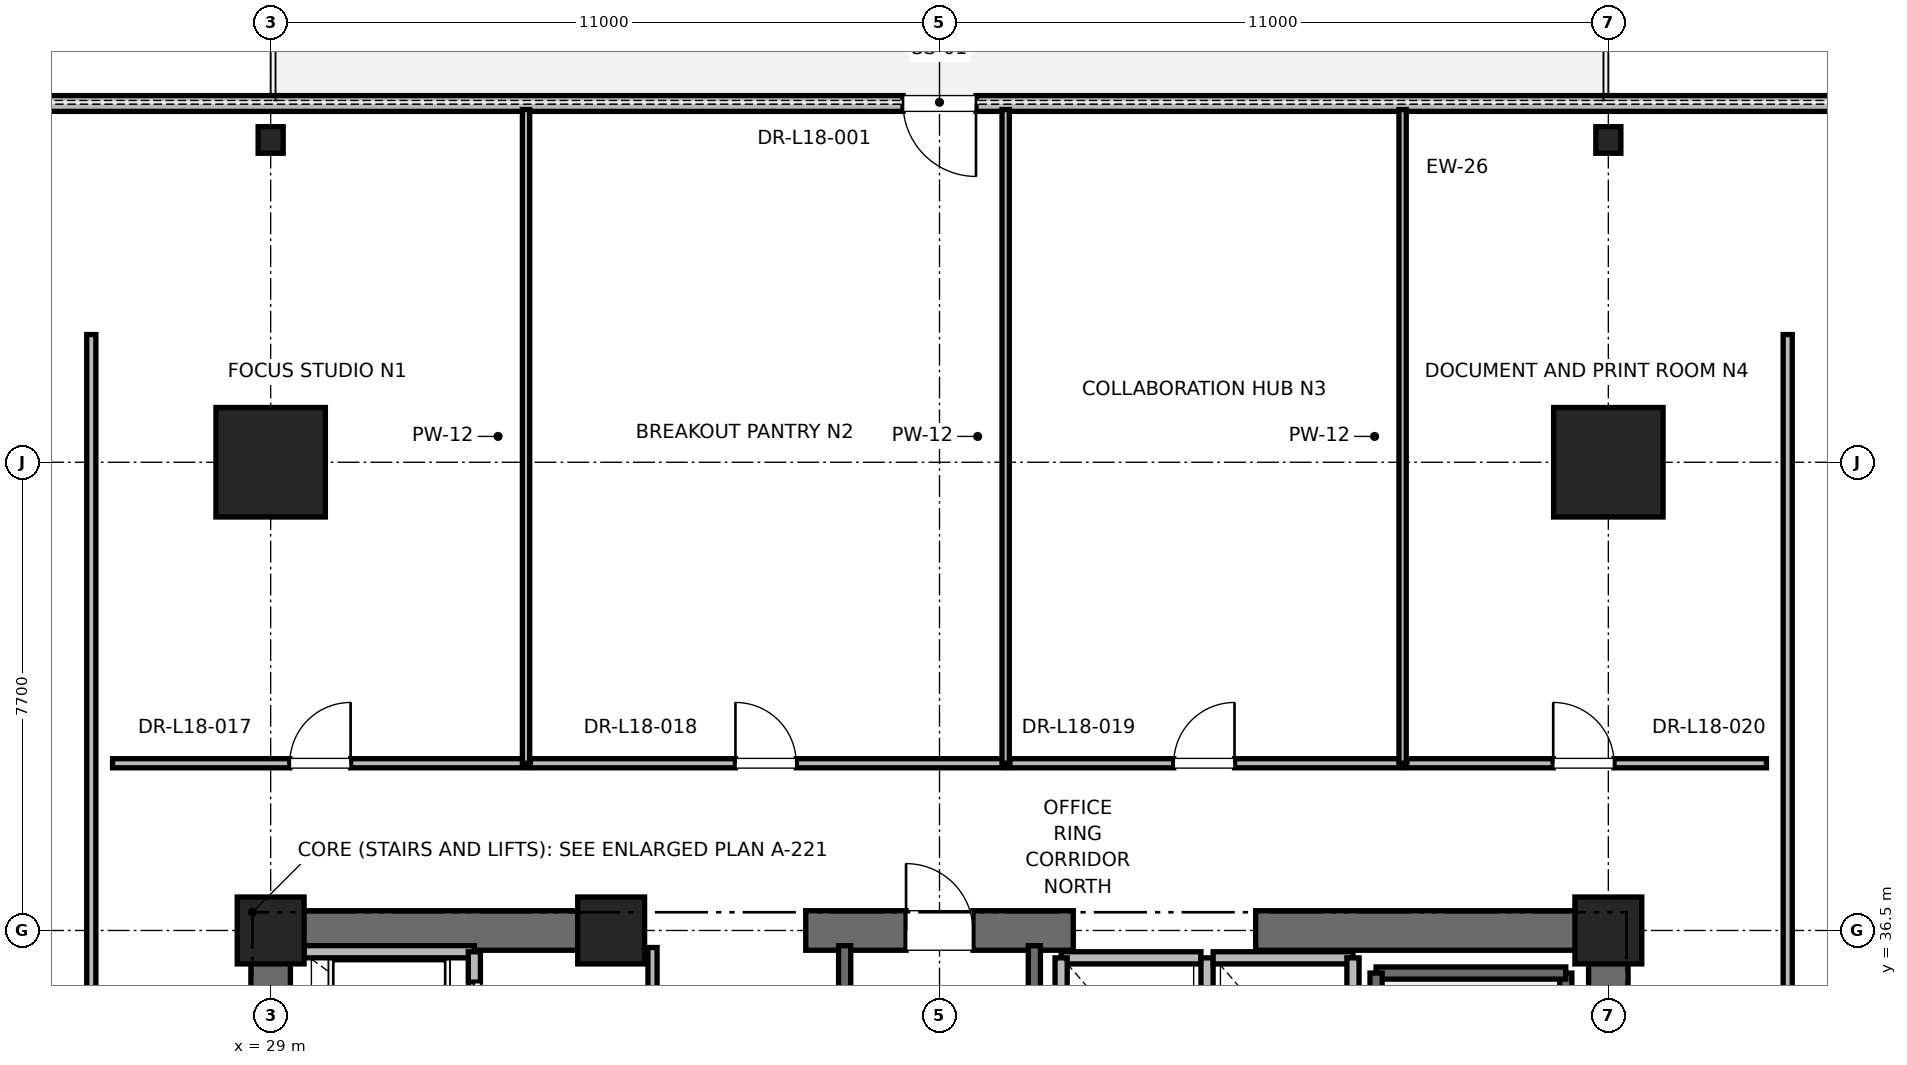
"""IFC4 building model, lengths in metres.
Left out: names, types, materials, properties, quantities, classifications, styles, units other than length and angle.
Written with IfcOpenShell. Run it as: python <this file> out.ifc"""

import sys

from ifc_helpers import new_model, si_unit, direction, frame, frame_2d, origin, origin_2d, place, context, subcontext, project, spatial, rectangle, i_section, extrude, element, fill, save


model = new_model("IFC4")
c1 = context("Model", 3, precision=1e-05, world=origin(), true_north=direction((0.0, 1.0)))
c2 = subcontext(c1, "Body", "Model", "MODEL_VIEW")
j1 = project(units=[si_unit("LENGTHUNIT", "METRE"), si_unit("PLANEANGLEUNIT", "RADIAN")], contexts=[c1])
p1 = place(None, origin())
s1 = spatial("IfcSite", under=j1, at=p1, CompositionType="ELEMENT")
p2 = place(p1, origin())
s2 = spatial("IfcBuilding", under=s1, at=p2, CompositionType="ELEMENT")
p3 = place(p2, frame((0.0, 0.0, 79.6)))
s3 = spatial("IfcBuildingStorey", under=s2, at=p3, CompositionType="ELEMENT", Elevation=79.6)
for number, where, z_axis, x_axis in (
    (1, (29.0, 44.2, 0.0), (0.0, 0.0, 1.0), (1.0, 0.0, 0.0)),
    (2, (51.0, 44.2, 0.0), (0.0, 0.0, 1.0), (1.0, 0.0, 0.0)),
):
    element("IfcColumn", number, at=place(p3, frame(where, z_axis=z_axis, x_axis=x_axis)), inside=s3, PredefinedType="COLUMN", context=c2, shape_type="SweptSolid", body=[
        extrude(rectangle(XDim=1.8, YDim=1.8, at=origin_2d()), origin(), (0.0, 0.0, 1.0), 4.0),
    ])
for number, where, z_axis, x_axis in (
    (3, (29.0, 49.5, 0.0), (0.0, 0.0, 1.0), (1.0, 0.0, 0.0)),
    (4, (51.0, 49.5, 0.0), (0.0, 0.0, 1.0), (1.0, 0.0, 0.0)),
):
    element("IfcColumn", number, at=place(p3, frame(where, z_axis=z_axis, x_axis=x_axis)), inside=s3, PredefinedType="COLUMN", context=c2, shape_type="SweptSolid", body=[
        extrude(i_section(OverallWidth=0.412, OverallDepth=0.437, WebThickness=0.036, FlangeThickness=0.058, FilletRadius=0.015, at=origin_2d()), origin(), (0.0, 0.0, 1.0), 4.0),
    ])
for number, where, z_axis, x_axis in (
    (5, (29.0, 36.5, 0.0), (0.0, 0.0, 1.0), (1.0, 0.0, 0.0)),
    (6, (51.0, 36.5, 0.0), (0.0, 0.0, 1.0), (1.0, 0.0, 0.0)),
    (7, (34.6, 36.5, 0.0), (0.0, 0.0, 1.0), (1.0, 0.0, 0.0)),
):
    element("IfcColumn", number, at=place(p3, frame(where, z_axis=z_axis, x_axis=x_axis)), inside=s3, PredefinedType="PILASTER", context=c2, shape_type="SweptSolid", body=[
        extrude(rectangle(XDim=1.1, YDim=1.1, at=origin_2d()), origin(), (0.0, 0.0, 1.0), 4.0),
    ])
p4 = place(p3, frame((29.0, 36.5, 0.0), z_axis=(0.0, 0.0, 1.0), x_axis=(1.0, 0.0, 0.0)))
e8 = element("IfcWall", 8, at=p4, inside=s3, PredefinedType="SHEAR", context=c2, shape_type="SweptSolid", body=[
    extrude(rectangle(XDim=5.8, YDim=0.65, at=frame_2d((2.9, 0.0))), origin(), (0.0, 0.0, 1.0), 3.76),
])
p5 = place(p3, frame((37.8, 36.5, 0.0), z_axis=(0.0, 0.0, 1.0), x_axis=(1.0, 0.0, 0.0)))
e9 = element("IfcWall", 9, at=p5, inside=s3, PredefinedType="SHEAR", context=c2, shape_type="SweptSolid", body=[
    extrude(rectangle(XDim=4.4, YDim=0.65, at=frame_2d((2.2, 0.0))), origin(), (0.0, 0.0, 1.0), 3.76),
])
p6 = place(p5, frame((1.65, 0.0, 0.0)))
e10 = element("IfcOpeningElement", 10, at=p6, cuts=e9, PredefinedType="OPENING", context=c2, shape_type="SweptSolid", body=[
    extrude(rectangle(XDim=1.1, YDim=2.15, at=frame_2d((0.55, 1.075))), frame((0.0, 0.325, 0.0), z_axis=(0.0, -1.0, 0.0), x_axis=(1.0, 0.0, 0.0)), (0.0, 0.0, 1.0), 0.65),
])
for number, where, z_axis, x_axis in (
    (11, (45.2, 36.5, 0.0), (0.0, 0.0, 1.0), (1.0, 0.0, 0.0)),
    (12, (29.0, 30.7, 0.0), (0.0, 0.0, 1.0), (0.0, 1.0, 0.0)),
):
    element("IfcWall", number, at=place(p3, frame(where, z_axis=z_axis, x_axis=x_axis)), inside=s3, PredefinedType="SHEAR", context=c2, shape_type="SweptSolid", body=[
        extrude(rectangle(XDim=5.8, YDim=0.65, at=frame_2d((2.9, 0.0))), origin(), (0.0, 0.0, 1.0), 3.76),
    ])
p7 = place(p3, frame((51.0, 27.7, 0.0), z_axis=(0.0, 0.0, 1.0), x_axis=(0.0, 1.0, 0.0)))
e13 = element("IfcWall", 13, at=p7, inside=s3, PredefinedType="SHEAR", context=c2, shape_type="SweptSolid", body=[
    extrude(rectangle(XDim=8.8, YDim=0.65, at=frame_2d((4.4, 0.0))), origin(), (0.0, 0.0, 1.0), 3.76),
])
p8 = place(p3, frame((62.429, 50.1, 0.0), z_axis=(0.0, 0.0, 1.0), x_axis=(-1.0, 0.0, 0.0)))
e14 = element("IfcWall", 14, at=p8, inside=s3, PredefinedType="PARAPET", context=c2, shape_type="SweptSolid", body=[
    extrude(rectangle(XDim=44.857, YDim=0.26, at=frame_2d((22.429, 0.0))), origin(), (0.0, 0.0, 1.0), 3.273),
])
p9 = place(p8, frame((4.2, 0.0, 0.85)))
e15 = element("IfcOpeningElement", 15, at=p9, cuts=e14, PredefinedType="OPENING", context=c2, shape_type="SweptSolid", body=[
    extrude(rectangle(XDim=1.8, YDim=2.2, at=frame_2d((0.9, 1.1))), frame((0.0, 0.13, 0.0), z_axis=(0.0, -1.0, 0.0), x_axis=(1.0, 0.0, 0.0)), (0.0, 0.0, 1.0), 0.26),
])
p10 = place(p8, frame((21.829, 0.0, 0.0)))
e16 = element("IfcOpeningElement", 16, at=p10, cuts=e14, PredefinedType="OPENING", context=c2, shape_type="SweptSolid", body=[
    extrude(rectangle(XDim=1.2, YDim=2.2, at=frame_2d((0.6, 1.1))), frame((0.0, 0.13, 0.0), z_axis=(0.0, -1.0, 0.0), x_axis=(1.0, 0.0, 0.0)), (0.0, 0.0, 1.0), 0.26),
])
p11 = place(p8, frame((38.857, 0.0, 0.85)))
e17 = element("IfcOpeningElement", 17, at=p11, cuts=e14, PredefinedType="OPENING", context=c2, shape_type="SweptSolid", body=[
    extrude(rectangle(XDim=1.8, YDim=2.2, at=frame_2d((0.9, 1.1))), frame((0.0, 0.13, 0.0), z_axis=(0.0, -1.0, 0.0), x_axis=(1.0, 0.0, 0.0)), (0.0, 0.0, 1.0), 0.26),
])
p12 = place(p3, frame((50.3, 27.65, 0.0), z_axis=(0.0, 0.0, 1.0), x_axis=(0.0, 1.0, 0.0)))
e18 = element("IfcWall", 18, at=p12, inside=s3, PredefinedType="SOLIDWALL", context=c2, shape_type="SweptSolid", body=[
    extrude(rectangle(XDim=8.15, YDim=0.2, at=frame_2d((4.075, 0.0))), origin(), (0.0, 0.0, 1.0), 3.76),
])
p13 = place(p3, frame((47.18, 35.8, 0.0), z_axis=(0.0, 0.0, 1.0), x_axis=(1.0, 0.0, 0.0)))
e19 = element("IfcWall", 19, at=p13, inside=s3, PredefinedType="SOLIDWALL", context=c2, shape_type="SweptSolid", body=[
    extrude(rectangle(XDim=3.12, YDim=0.2, at=frame_2d((1.56, 0.0))), origin(), (0.0, 0.0, 1.0), 3.76),
])
p14 = place(p3, frame((47.18, 27.62, 0.0), z_axis=(0.0, 0.0, 1.0), x_axis=(0.0, 1.0, 0.0)))
e20 = element("IfcWall", 20, at=p14, inside=s3, PredefinedType="SOLIDWALL", context=c2, shape_type="SweptSolid", body=[
    extrude(rectangle(XDim=8.18, YDim=0.2, at=frame_2d((4.09, 0.0))), origin(), (0.0, 0.0, 1.0), 3.76),
])
p15 = place(p3, frame((38.44, 27.38, 0.0), z_axis=(0.0, 0.0, 1.0), x_axis=(0.0, 1.0, 0.0)))
e21 = element("IfcWall", 21, at=p15, inside=s3, PredefinedType="SOLIDWALL", context=c2, shape_type="SweptSolid", body=[
    extrude(rectangle(XDim=8.87, YDim=0.2, at=frame_2d((4.435, 0.0))), origin(), (0.0, 0.0, 1.0), 3.76),
])
p16 = place(p3, frame((41.56, 27.68, 0.0), z_axis=(0.0, 0.0, 1.0), x_axis=(0.0, 1.0, 0.0)))
e22 = element("IfcWall", 22, at=p16, inside=s3, PredefinedType="SOLIDWALL", context=c2, shape_type="SweptSolid", body=[
    extrude(rectangle(XDim=8.57, YDim=0.2, at=frame_2d((4.285, 0.0))), origin(), (0.0, 0.0, 1.0), 3.76),
])
p17 = place(p3, frame((32.35, 36.15, 0.0), z_axis=(0.0, 0.0, 1.0), x_axis=(-1.0, 0.0, 0.0)))
e23 = element("IfcWall", 23, at=p17, inside=s3, PredefinedType="SOLIDWALL", context=c2, shape_type="SweptSolid", body=[
    extrude(rectangle(XDim=2.8, YDim=0.2, at=frame_2d((1.4, 0.0))), origin(), (0.0, 0.0, 1.0), 2.889),
])
p18 = place(p3, frame((32.35, 34.05, 0.0), z_axis=(0.0, 0.0, 1.0), x_axis=(0.0, 1.0, 0.0)))
e24 = element("IfcWall", 24, at=p18, inside=s3, PredefinedType="SOLIDWALL", context=c2, shape_type="SweptSolid", body=[
    extrude(rectangle(XDim=2.1, YDim=0.2, at=frame_2d((1.05, 0.0))), origin(), (0.0, 0.0, 1.0), 3.76),
])
p19 = place(p18, frame((0.5, 0.0, 0.0)))
e25 = element("IfcOpeningElement", 25, at=p19, cuts=e24, PredefinedType="OPENING", context=c2, shape_type="SweptSolid", body=[
    extrude(rectangle(XDim=1.1, YDim=2.2, at=frame_2d((0.55, 1.1))), frame((0.0, 0.1, 0.0), z_axis=(0.0, -1.0, 0.0), x_axis=(1.0, 0.0, 0.0)), (0.0, 0.0, 1.0), 0.2),
])
p20 = place(p3, frame((44.3, 36.05, 0.0), z_axis=(0.0, 0.0, 1.0), x_axis=(-1.0, 0.0, 0.0)))
e26 = element("IfcWall", 26, at=p20, inside=s3, PredefinedType="SOLIDWALL", context=c2, shape_type="SweptSolid", body=[
    extrude(rectangle(XDim=2.3, YDim=0.2, at=frame_2d((1.15, 0.0))), origin(), (0.0, 0.0, 1.0), 2.54),
])
for number, where, z_axis, x_axis in (
    (27, (42.0, 36.05, 0.0), (0.0, 0.0, 1.0), (0.0, -1.0, 0.0)),
    (28, (44.4, 33.45, 0.0), (0.0, 0.0, 1.0), (0.0, 1.0, 0.0)),
):
    element("IfcWall", number, at=place(p3, frame(where, z_axis=z_axis, x_axis=x_axis)), inside=s3, PredefinedType="SOLIDWALL", context=c2, shape_type="SweptSolid", body=[
        extrude(rectangle(XDim=2.6, YDim=0.2, at=frame_2d((1.3, 0.0))), origin(), (0.0, 0.0, 1.0), 2.54),
    ])
p21 = place(p3, frame((46.8, 36.05, 0.0), z_axis=(0.0, 0.0, 1.0), x_axis=(-1.0, 0.0, 0.0)))
e29 = element("IfcWall", 29, at=p21, inside=s3, PredefinedType="SOLIDWALL", context=c2, shape_type="SweptSolid", body=[
    extrude(rectangle(XDim=2.3, YDim=0.2, at=frame_2d((1.15, 0.0))), origin(), (0.0, 0.0, 1.0), 2.54),
])
p22 = place(p3, frame((46.8, 33.45, 0.0), z_axis=(0.0, 0.0, 1.0), x_axis=(0.0, 1.0, 0.0)))
e30 = element("IfcWall", 30, at=p22, inside=s3, PredefinedType="SOLIDWALL", context=c2, shape_type="SweptSolid", body=[
    extrude(rectangle(XDim=2.6, YDim=0.2, at=frame_2d((1.3, 0.0))), origin(), (0.0, 0.0, 1.0), 3.76),
])
p23 = place(p3, frame((35.28, 33.95, 0.0), z_axis=(0.0, 0.0, 1.0), x_axis=(0.0, 1.0, 0.0)))
e31 = element("IfcWall", 31, at=p23, inside=s3, PredefinedType="PARTITIONING", context=c2, shape_type="SweptSolid", body=[
    extrude(rectangle(XDim=2.27, YDim=0.15, at=frame_2d((1.135, 0.0))), origin(), (0.0, 0.0, 1.0), 2.54),
])
p24 = place(p23, frame((0.66, 0.0, 0.0)))
e32 = element("IfcOpeningElement", 32, at=p24, cuts=e31, PredefinedType="OPENING", context=c2, shape_type="SweptSolid", body=[
    extrude(rectangle(XDim=0.95, YDim=2.15, at=frame_2d((0.475, 1.075))), frame((0.0, 0.075, 0.0), z_axis=(0.0, -1.0, 0.0), x_axis=(1.0, 0.0, 0.0)), (0.0, 0.0, 1.0), 0.15),
])
p25 = place(p3, frame((26.4, 39.25, 0.0), z_axis=(0.0, 0.0, 1.0), x_axis=(1.0, 0.0, 0.0)))
e33 = element("IfcWall", 33, at=p25, inside=s3, PredefinedType="PARTITIONING", context=c2, shape_type="SweptSolid", body=[
    extrude(rectangle(XDim=6.8, YDim=0.15, at=frame_2d((3.4, 0.0))), origin(), (0.0, 0.0, 1.0), 2.85),
])
p26 = place(p25, frame((2.915, 0.0, 0.0)))
e34 = element("IfcOpeningElement", 34, at=p26, cuts=e33, PredefinedType="OPENING", context=c2, shape_type="SweptSolid", body=[
    extrude(rectangle(XDim=1.0, YDim=2.15, at=frame_2d((0.5, 1.075))), frame((0.0, 0.075, 0.0), z_axis=(0.0, -1.0, 0.0), x_axis=(1.0, 0.0, 0.0)), (0.0, 0.0, 1.0), 0.15),
])
p27 = place(p3, frame((33.2, 39.25, 0.0), z_axis=(0.0, 0.0, 1.0), x_axis=(0.0, 1.0, 0.0)))
e35 = element("IfcWall", 35, at=p27, inside=s3, PredefinedType="PARTITIONING", context=c2, shape_type="SweptSolid", body=[
    extrude(rectangle(XDim=10.75, YDim=0.12, at=frame_2d((5.375, 0.0))), origin(), (0.0, 0.0, 1.0), 2.39),
])
p28 = place(p3, frame((33.27, 39.25, 0.0), z_axis=(0.0, 0.0, 1.0), x_axis=(1.0, 0.0, 0.0)))
e36 = element("IfcWall", 36, at=p28, inside=s3, PredefinedType="PARTITIONING", context=c2, shape_type="SweptSolid", body=[
    extrude(rectangle(XDim=7.818, YDim=0.15, at=frame_2d((3.909, 0.0))), origin(), (0.0, 0.0, 1.0), 2.85),
])
p29 = place(p28, frame((3.374, 0.0, 0.0)))
e37 = element("IfcOpeningElement", 37, at=p29, cuts=e36, PredefinedType="OPENING", context=c2, shape_type="SweptSolid", body=[
    extrude(rectangle(XDim=1.0, YDim=2.15, at=frame_2d((0.5, 1.075))), frame((0.0, 0.075, 0.0), z_axis=(0.0, -1.0, 0.0), x_axis=(1.0, 0.0, 0.0)), (0.0, 0.0, 1.0), 0.15),
])
p30 = place(p3, frame((41.088, 39.25, 0.0), z_axis=(0.0, 0.0, 1.0), x_axis=(0.0, 1.0, 0.0)))
e38 = element("IfcWall", 38, at=p30, inside=s3, PredefinedType="PARTITIONING", context=c2, shape_type="SweptSolid", body=[
    extrude(rectangle(XDim=10.75, YDim=0.12, at=frame_2d((5.375, 0.0))), origin(), (0.0, 0.0, 1.0), 2.39),
])
p31 = place(p3, frame((41.158, 39.25, 0.0), z_axis=(0.0, 0.0, 1.0), x_axis=(1.0, 0.0, 0.0)))
e39 = element("IfcWall", 39, at=p31, inside=s3, PredefinedType="PARTITIONING", context=c2, shape_type="SweptSolid", body=[
    extrude(rectangle(XDim=6.458, YDim=0.15, at=frame_2d((3.229, 0.0))), origin(), (0.0, 0.0, 1.0), 2.85),
])
p32 = place(p31, frame((2.694, 0.0, 0.0)))
e40 = element("IfcOpeningElement", 40, at=p32, cuts=e39, PredefinedType="OPENING", context=c2, shape_type="SweptSolid", body=[
    extrude(rectangle(XDim=1.0, YDim=2.15, at=frame_2d((0.5, 1.075))), frame((0.0, 0.075, 0.0), z_axis=(0.0, -1.0, 0.0), x_axis=(1.0, 0.0, 0.0)), (0.0, 0.0, 1.0), 0.15),
])
p33 = place(p3, frame((47.616, 39.25, 0.0), z_axis=(0.0, 0.0, 1.0), x_axis=(0.0, 1.0, 0.0)))
e41 = element("IfcWall", 41, at=p33, inside=s3, PredefinedType="PARTITIONING", context=c2, shape_type="SweptSolid", body=[
    extrude(rectangle(XDim=10.75, YDim=0.12, at=frame_2d((5.375, 0.0))), origin(), (0.0, 0.0, 1.0), 2.39),
])
p34 = place(p3, frame((47.686, 39.25, 0.0), z_axis=(0.0, 0.0, 1.0), x_axis=(1.0, 0.0, 0.0)))
e42 = element("IfcWall", 42, at=p34, inside=s3, PredefinedType="PARTITIONING", context=c2, shape_type="SweptSolid", body=[
    extrude(rectangle(XDim=5.914, YDim=0.15, at=frame_2d((2.957, 0.0))), origin(), (0.0, 0.0, 1.0), 2.85),
])
p35 = place(p34, frame((2.407, 0.0, 0.0)))
e43 = element("IfcOpeningElement", 43, at=p35, cuts=e42, PredefinedType="OPENING", context=c2, shape_type="SweptSolid", body=[
    extrude(rectangle(XDim=1.0, YDim=2.15, at=frame_2d((0.5, 1.075))), frame((0.0, 0.075, 0.0), z_axis=(0.0, -1.0, 0.0), x_axis=(1.0, 0.0, 0.0)), (0.0, 0.0, 1.0), 0.15),
])
p36 = place(p3, frame((26.05, 8.7, 0.0), z_axis=(0.0, 0.0, 1.0), x_axis=(0.0, 1.0, 0.0)))
e44 = element("IfcWall", 44, at=p36, inside=s3, PredefinedType="PARTITIONING", context=c2, shape_type="SweptSolid", body=[
    extrude(rectangle(XDim=37.6, YDim=0.15, at=frame_2d((18.8, 0.0))), origin(), (0.0, 0.0, 1.0), 2.85),
])
p37 = place(p36, frame((18.3, 0.0, 0.0)))
e45 = element("IfcOpeningElement", 45, at=p37, cuts=e44, PredefinedType="OPENING", context=c2, shape_type="SweptSolid", body=[
    extrude(rectangle(XDim=1.0, YDim=2.15, at=frame_2d((0.5, 1.075))), frame((0.0, 0.075, 0.0), z_axis=(0.0, -1.0, 0.0), x_axis=(1.0, 0.0, 0.0)), (0.0, 0.0, 1.0), 0.15),
])
p38 = place(p3, frame((53.95, 29.826, 0.0), z_axis=(0.0, 0.0, 1.0), x_axis=(0.0, 1.0, 0.0)))
e46 = element("IfcWall", 46, at=p38, inside=s3, PredefinedType="PARTITIONING", context=c2, shape_type="SweptSolid", body=[
    extrude(rectangle(XDim=16.474, YDim=0.15, at=frame_2d((8.237, 0.0))), origin(), (0.0, 0.0, 1.0), 2.85),
])
p39 = place(p38, frame((2.787, 0.0, 0.0)))
e47 = element("IfcOpeningElement", 47, at=p39, cuts=e46, PredefinedType="OPENING", context=c2, shape_type="SweptSolid", body=[
    extrude(rectangle(XDim=1.0, YDim=2.15, at=frame_2d((0.5, 1.075))), frame((0.0, 0.075, 0.0), z_axis=(0.0, -1.0, 0.0), x_axis=(1.0, 0.0, 0.0)), (0.0, 0.0, 1.0), 0.15),
])
p40 = place(p10, origin())
e48 = element("IfcDoor", 48, at=p40, inside=s3, OperationType="SINGLE_SWING_LEFT", PredefinedType="DOOR", context=c2, shape_type="SweptSolid", body=[
    extrude(rectangle(XDim=1.2, YDim=2.2, at=frame_2d((0.6, 1.1))), frame((0.0, 0.025, 0.0), z_axis=(0.0, -1.0, 0.0), x_axis=(1.0, 0.0, 0.0)), (0.0, 0.0, 1.0), 0.05),
])
fill(e16, e48)
p41 = place(p6, origin())
e49 = element("IfcDoor", 49, at=p41, inside=s3, OperationType="SINGLE_SWING_LEFT", PredefinedType="DOOR", context=c2, shape_type="SweptSolid", body=[
    extrude(rectangle(XDim=1.1, YDim=2.15, at=frame_2d((0.55, 1.075))), frame((0.0, 0.025, 0.0), z_axis=(0.0, -1.0, 0.0), x_axis=(1.0, 0.0, 0.0)), (0.0, 0.0, 1.0), 0.05),
])
fill(e10, e49)
p42 = place(p19, origin())
e50 = element("IfcDoor", 50, at=p42, inside=s3, OperationType="SLIDING_TO_RIGHT", PredefinedType="DOOR", context=c2, shape_type="SweptSolid", body=[
    extrude(rectangle(XDim=1.1, YDim=2.2, at=frame_2d((0.55, 1.1))), frame((0.0, 0.025, 0.0), z_axis=(0.0, -1.0, 0.0), x_axis=(1.0, 0.0, 0.0)), (0.0, 0.0, 1.0), 0.05),
])
fill(e25, e50)
p43 = place(p26, origin())
e51 = element("IfcDoor", 51, at=p43, inside=s3, OperationType="SINGLE_SWING_RIGHT", PredefinedType="DOOR", context=c2, shape_type="SweptSolid", body=[
    extrude(rectangle(XDim=1.0, YDim=2.15, at=frame_2d((0.5, 1.075))), frame((0.0, 0.025, 0.0), z_axis=(0.0, -1.0, 0.0), x_axis=(1.0, 0.0, 0.0)), (0.0, 0.0, 1.0), 0.05),
])
fill(e34, e51)
p44 = place(p29, origin())
e52 = element("IfcDoor", 52, at=p44, inside=s3, OperationType="SINGLE_SWING_LEFT", PredefinedType="DOOR", context=c2, shape_type="SweptSolid", body=[
    extrude(rectangle(XDim=1.0, YDim=2.15, at=frame_2d((0.5, 1.075))), frame((0.0, 0.025, 0.0), z_axis=(0.0, -1.0, 0.0), x_axis=(1.0, 0.0, 0.0)), (0.0, 0.0, 1.0), 0.05),
])
fill(e37, e52)
p45 = place(p32, origin())
e53 = element("IfcDoor", 53, at=p45, inside=s3, OperationType="SINGLE_SWING_RIGHT", PredefinedType="DOOR", context=c2, shape_type="SweptSolid", body=[
    extrude(rectangle(XDim=1.0, YDim=2.15, at=frame_2d((0.5, 1.075))), frame((0.0, 0.025, 0.0), z_axis=(0.0, -1.0, 0.0), x_axis=(1.0, 0.0, 0.0)), (0.0, 0.0, 1.0), 0.05),
])
fill(e40, e53)
p46 = place(p35, origin())
e54 = element("IfcDoor", 54, at=p46, inside=s3, OperationType="SINGLE_SWING_LEFT", PredefinedType="DOOR", context=c2, shape_type="SweptSolid", body=[
    extrude(rectangle(XDim=1.0, YDim=2.15, at=frame_2d((0.5, 1.075))), frame((0.0, 0.025, 0.0), z_axis=(0.0, -1.0, 0.0), x_axis=(1.0, 0.0, 0.0)), (0.0, 0.0, 1.0), 0.05),
])
fill(e43, e54)
save(model, sys.argv[1])
